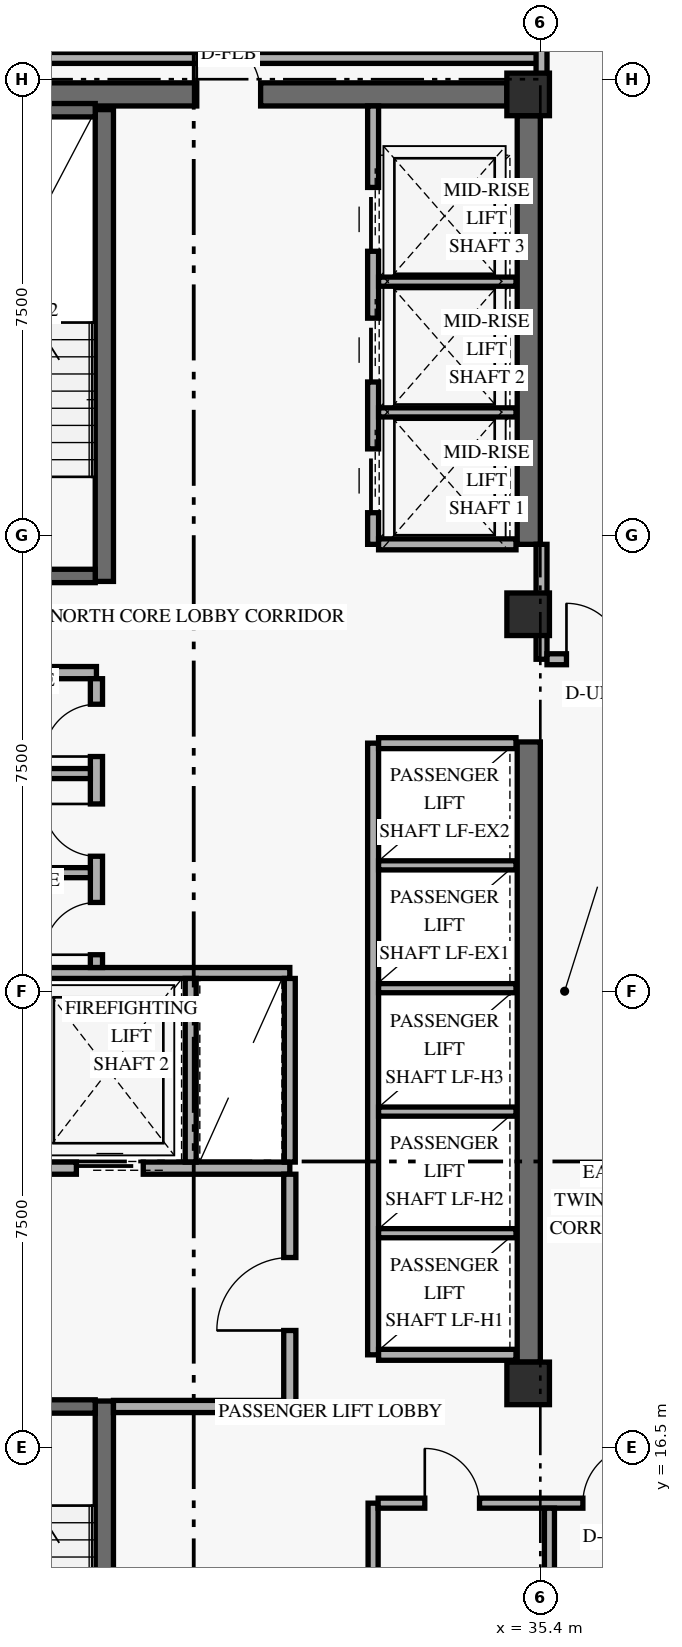
"""IFC4 building model, lengths in metres.
Left out: names, types, materials, properties, quantities, classifications, styles, units other than length and angle.
Written with IfcOpenShell. Run it as: python <this file> out.ifc"""

import sys

from ifc_helpers import new_model, si_unit, direction, frame, frame_2d, origin, origin_2d, place, context, subcontext, project, spatial, rectangle, extrude, element, fill, save


model = new_model("IFC4")
c1 = context("Model", 3, precision=1e-05, world=origin(), true_north=direction((0.0, 1.0)))
c2 = subcontext(c1, "Body", "Model", "MODEL_VIEW")
j1 = project(units=[si_unit("LENGTHUNIT", "METRE"), si_unit("PLANEANGLEUNIT", "RADIAN")], contexts=[c1])
p1 = place(None, origin())
s1 = spatial("IfcSite", under=j1, at=p1, CompositionType="ELEMENT")
p2 = place(p1, origin())
s2 = spatial("IfcBuilding", under=s1, at=p2, CompositionType="ELEMENT")
p3 = place(p2, frame((0.0, 0.0, 151.8)))
s3 = spatial("IfcBuildingStorey", under=s2, at=p3, CompositionType="ELEMENT", Elevation=151.8)
p4 = place(p3, frame((35.21, 17.9, 0.0), z_axis=(0.0, 0.0, 1.0), x_axis=(0.0, 1.0, 0.0)))
e1 = element("IfcWall", 1, at=p4, inside=s3, PredefinedType="SHEAR", context=c2, shape_type="SweptSolid", body=[
    extrude(rectangle(XDim=10.2, YDim=0.38, at=frame_2d((5.1, 0.0))), origin(), (0.0, 0.0, 1.0), 2.748),
])
p5 = place(p3, frame((35.21, 31.35, 0.0), z_axis=(0.0, 0.0, 1.0), x_axis=(0.0, 1.0, 0.0)))
e2 = element("IfcWall", 2, at=p5, inside=s3, PredefinedType="SHEAR", context=c2, shape_type="SweptSolid", body=[
    extrude(rectangle(XDim=7.05, YDim=0.38, at=frame_2d((3.525, 0.0))), origin(), (0.0, 0.0, 1.0), 2.748),
])
p6 = place(p3, frame((24.55, 38.75, 0.0), z_axis=(0.0, 0.0, 1.0), x_axis=(1.0, 0.0, 0.0)))
e3 = element("IfcWall", 3, at=p6, inside=s3, PredefinedType="SHEAR", context=c2, shape_type="SweptSolid", body=[
    extrude(rectangle(XDim=10.3, YDim=0.38, at=frame_2d((5.15, 0.0))), origin(), (0.0, 0.0, 1.0), 3.36),
])
p7 = place(p6, frame((5.2, 0.0, 0.0)))
e4 = element("IfcOpeningElement", 4, at=p7, cuts=e3, PredefinedType="OPENING", context=c2, shape_type="SweptSolid", body=[
    extrude(rectangle(XDim=1.05, YDim=2.15, at=frame_2d((0.525, 1.075))), frame((0.0, 0.2, 0.0), z_axis=(0.0, -1.0, 0.0), x_axis=(1.0, 0.0, 0.0)), (0.0, 0.0, 1.0), 0.4),
])
p8 = place(p3, frame((28.23, 9.5, 0.0), z_axis=(0.0, 0.0, 1.0), x_axis=(0.0, 1.0, 0.0)))
e5 = element("IfcWall", 5, at=p8, inside=s3, PredefinedType="SHEAR", context=c2, shape_type="SweptSolid", body=[
    extrude(rectangle(XDim=7.76, YDim=0.3, at=frame_2d((3.88, 0.0))), origin(), (0.0, 0.0, 1.0), 3.36),
])
p9 = place(p3, frame((24.92, 17.17, 0.0), z_axis=(0.0, 0.0, 1.0), x_axis=(1.0, 0.0, 0.0)))
e6 = element("IfcWall", 6, at=p9, inside=s3, PredefinedType="SHEAR", context=c2, shape_type="SweptSolid", body=[
    extrude(rectangle(XDim=3.16, YDim=0.22, at=frame_2d((1.58, 0.0))), origin(), (0.0, 0.0, 1.0), 3.36),
])
p10 = place(p9, frame((0.78, 0.0, 0.0)))
e7 = element("IfcOpeningElement", 7, at=p10, cuts=e6, PredefinedType="OPENING", context=c2, shape_type="SweptSolid", body=[
    extrude(rectangle(XDim=1.05, YDim=2.15, at=frame_2d((0.525, 1.075))), frame((0.0, 0.12, 0.0), z_axis=(0.0, -1.0, 0.0), x_axis=(1.0, 0.0, 0.0)), (0.0, 0.0, 1.0), 0.24),
])
p11 = place(p3, frame((28.23, 30.74, 0.0), z_axis=(0.0, 0.0, 1.0), x_axis=(0.0, 1.0, 0.0)))
e8 = element("IfcWall", 8, at=p11, inside=s3, PredefinedType="SHEAR", context=c2, shape_type="SweptSolid", body=[
    extrude(rectangle(XDim=7.76, YDim=0.3, at=frame_2d((3.88, 0.0))), origin(), (0.0, 0.0, 1.0), 3.36),
])
p12 = place(p3, frame((24.92, 30.83, 0.0), z_axis=(0.0, 0.0, 1.0), x_axis=(1.0, 0.0, 0.0)))
e9 = element("IfcWall", 9, at=p12, inside=s3, PredefinedType="SHEAR", context=c2, shape_type="SweptSolid", body=[
    extrude(rectangle(XDim=3.16, YDim=0.22, at=frame_2d((1.58, 0.0))), origin(), (0.0, 0.0, 1.0), 3.36),
])
p13 = place(p12, frame((0.78, 0.0, 0.0)))
e10 = element("IfcOpeningElement", 10, at=p13, cuts=e9, PredefinedType="OPENING", context=c2, shape_type="SweptSolid", body=[
    extrude(rectangle(XDim=1.05, YDim=2.15, at=frame_2d((0.525, 1.075))), frame((0.0, 0.12, 0.0), z_axis=(0.0, -1.0, 0.0), x_axis=(1.0, 0.0, 0.0)), (0.0, 0.0, 1.0), 0.24),
])
p14 = place(p3, frame((24.92, 38.49, 0.0), z_axis=(0.0, 0.0, 1.0), x_axis=(1.0, 0.0, 0.0)))
e11 = element("IfcWall", 11, at=p14, inside=s3, PredefinedType="SHEAR", context=c2, shape_type="SweptSolid", body=[
    extrude(rectangle(XDim=3.16, YDim=0.22, at=frame_2d((1.58, 0.0))), origin(), (0.0, 0.0, 1.0), 3.36),
])
for number, where, z_axis, x_axis in (
    (12, (35.2, 17.55, 0.0), (0.0, 0.0, 1.0), (1.0, 0.0, 0.0)),
    (13, (35.2, 30.2, 0.0), (0.0, 0.0, 1.0), (1.0, 0.0, 0.0)),
    (14, (35.2, 38.75, 0.0), (0.0, 0.0, 1.0), (1.0, 0.0, 0.0)),
):
    element("IfcColumn", number, at=place(p3, frame(where, z_axis=z_axis, x_axis=x_axis)), inside=s3, PredefinedType="COLUMN", context=c2, shape_type="SweptSolid", body=[
        extrude(rectangle(XDim=0.7, YDim=0.7, at=origin_2d()), origin(), (0.0, 0.0, 1.0), 3.6),
    ])
p15 = place(p3, frame((24.45, 21.09, 0.0), z_axis=(0.0, 0.0, 1.0), x_axis=(1.0, 0.0, 0.0)))
e15 = element("IfcWall", 15, at=p15, inside=s3, PredefinedType="STANDARD", context=c2, shape_type="SweptSolid", body=[
    extrude(rectangle(XDim=6.83, YDim=0.2, at=frame_2d((3.415, 0.0))), origin(), (0.0, 0.0, 1.0), 3.36),
])
p16 = place(p15, frame((0.72, 0.0, 0.0)))
e16 = element("IfcOpeningElement", 16, at=p16, cuts=e15, PredefinedType="OPENING", context=c2, shape_type="SweptSolid", body=[
    extrude(rectangle(XDim=1.1, YDim=2.2, at=frame_2d((0.55, 1.1))), frame((0.0, 0.11, 0.0), z_axis=(0.0, -1.0, 0.0), x_axis=(1.0, 0.0, 0.0)), (0.0, 0.0, 1.0), 0.22),
])
p17 = place(p15, frame((3.32, 0.0, 0.0)))
e17 = element("IfcOpeningElement", 17, at=p17, cuts=e15, PredefinedType="OPENING", context=c2, shape_type="SweptSolid", body=[
    extrude(rectangle(XDim=1.1, YDim=2.2, at=frame_2d((0.55, 1.1))), frame((0.0, 0.11, 0.0), z_axis=(0.0, -1.0, 0.0), x_axis=(1.0, 0.0, 0.0)), (0.0, 0.0, 1.0), 0.22),
])
p18 = place(p3, frame((28.38, 17.17, 0.0), z_axis=(0.0, 0.0, 1.0), x_axis=(1.0, 0.0, 0.0)))
e18 = element("IfcWall", 18, at=p18, inside=s3, PredefinedType="STANDARD", context=c2, shape_type="SweptSolid", body=[
    extrude(rectangle(XDim=2.9, YDim=0.2, at=frame_2d((1.45, 0.0))), origin(), (0.0, 0.0, 1.0), 3.36),
])
p19 = place(p3, frame((31.28, 17.07, 0.0), z_axis=(0.0, 0.0, 1.0), x_axis=(0.0, 1.0, 0.0)))
e19 = element("IfcWall", 19, at=p19, inside=s3, PredefinedType="STANDARD", context=c2, shape_type="SweptSolid", body=[
    extrude(rectangle(XDim=3.92, YDim=0.2, at=frame_2d((1.96, 0.0))), origin(), (0.0, 0.0, 1.0), 2.73),
])
p20 = place(p19, frame((1.35, 0.0, 0.0)))
e20 = element("IfcOpeningElement", 20, at=p20, cuts=e19, PredefinedType="OPENING", context=c2, shape_type="SweptSolid", body=[
    extrude(rectangle(XDim=1.2, YDim=2.15, at=frame_2d((0.6, 1.075))), frame((0.0, 0.11, 0.0), z_axis=(0.0, -1.0, 0.0), x_axis=(1.0, 0.0, 0.0)), (0.0, 0.0, 1.0), 0.22),
])
p21 = place(p3, frame((24.45, 24.3, 0.0), z_axis=(0.0, 0.0, 1.0), x_axis=(1.0, 0.0, 0.0)))
e21 = element("IfcWall", 21, at=p21, inside=s3, PredefinedType="STANDARD", context=c2, shape_type="SweptSolid", body=[
    extrude(rectangle(XDim=6.83, YDim=0.18, at=frame_2d((3.415, 0.0))), origin(), (0.0, 0.0, 1.0), 3.36),
])
for number, where, z_axis, x_axis in (
    (22, (29.65, 21.19, 0.0), (0.0, 0.0, 1.0), (0.0, 1.0, 0.0)),
    (23, (31.28, 21.19, 0.0), (0.0, 0.0, 1.0), (0.0, 1.0, 0.0)),
):
    element("IfcWall", number, at=place(p3, frame(where, z_axis=z_axis, x_axis=x_axis)), inside=s3, PredefinedType="STANDARD", context=c2, shape_type="SweptSolid", body=[
        extrude(rectangle(XDim=3.02, YDim=0.18, at=frame_2d((1.51, 0.0))), origin(), (0.0, 0.0, 1.0), 3.36),
    ])
p22 = place(p3, frame((24.45, 29.24, 0.0), z_axis=(0.0, 0.0, 1.0), x_axis=(1.0, 0.0, 0.0)))
e24 = element("IfcWall", 24, at=p22, inside=s3, PredefinedType="STANDARD", context=c2, shape_type="SweptSolid", body=[
    extrude(rectangle(XDim=3.65, YDim=0.2, at=frame_2d((1.825, 0.0))), origin(), (0.0, 0.0, 1.0), 3.36),
])
p23 = place(p3, frame((28.1, 24.39, 0.0), z_axis=(0.0, 0.0, 1.0), x_axis=(0.0, 1.0, 0.0)))
e25 = element("IfcWall", 25, at=p23, inside=s3, PredefinedType="STANDARD", context=c2, shape_type="SweptSolid", body=[
    extrude(rectangle(XDim=4.75, YDim=0.2, at=frame_2d((2.375, 0.0))), origin(), (0.0, 0.0, 1.0), 3.36),
])
p24 = place(p23, frame((0.21, 0.0, 0.0)))
e26 = element("IfcOpeningElement", 26, at=p24, cuts=e25, PredefinedType="OPENING", context=c2, shape_type="SweptSolid", body=[
    extrude(rectangle(XDim=0.86, YDim=2.1, at=frame_2d((0.43, 1.05))), frame((0.0, 0.11, 0.0), z_axis=(0.0, -1.0, 0.0), x_axis=(1.0, 0.0, 0.0)), (0.0, 0.0, 1.0), 0.22),
])
p25 = place(p23, frame((1.83, 0.0, 0.0)))
e27 = element("IfcOpeningElement", 27, at=p25, cuts=e25, PredefinedType="OPENING", context=c2, shape_type="SweptSolid", body=[
    extrude(rectangle(XDim=0.86, YDim=2.1, at=frame_2d((0.43, 1.05))), frame((0.0, 0.11, 0.0), z_axis=(0.0, -1.0, 0.0), x_axis=(1.0, 0.0, 0.0)), (0.0, 0.0, 1.0), 0.22),
])
p26 = place(p23, frame((3.47, 0.0, 0.0)))
e28 = element("IfcOpeningElement", 28, at=p26, cuts=e25, PredefinedType="OPENING", context=c2, shape_type="SweptSolid", body=[
    extrude(rectangle(XDim=0.86, YDim=2.1, at=frame_2d((0.43, 1.05))), frame((0.0, 0.11, 0.0), z_axis=(0.0, -1.0, 0.0), x_axis=(1.0, 0.0, 0.0)), (0.0, 0.0, 1.0), 0.22),
])
for number, where, z_axis, x_axis in (
    (29, (24.45, 25.95, 0.0), (0.0, 0.0, 1.0), (1.0, 0.0, 0.0)),
    (30, (24.45, 27.58, 0.0), (0.0, 0.0, 1.0), (1.0, 0.0, 0.0)),
):
    element("IfcWall", number, at=place(p3, frame(where, z_axis=z_axis, x_axis=x_axis)), inside=s3, PredefinedType="PARTITIONING", context=c2, shape_type="SweptSolid", body=[
        extrude(rectangle(XDim=3.55, YDim=0.165, at=frame_2d((1.775, 0.0))), origin(), (0.0, 0.0, 1.0), 3.36),
    ])
p27 = place(p3, frame((32.65, 18.02, 0.0), z_axis=(0.0, 0.0, 1.0), x_axis=(0.0, 1.0, 0.0)))
e31 = element("IfcWall", 31, at=p27, inside=s3, PredefinedType="STANDARD", context=c2, shape_type="SweptSolid", body=[
    extrude(rectangle(XDim=10.06, YDim=0.18, at=frame_2d((5.03, 0.0))), origin(), (0.0, 0.0, 1.0), 3.36),
])
for number, where, z_axis, x_axis in (
    (32, (32.74, 18.02, 0.0), (0.0, 0.0, 1.0), (1.0, 0.0, 0.0)),
    (33, (32.74, 28.08, 0.0), (0.0, 0.0, 1.0), (1.0, 0.0, 0.0)),
):
    element("IfcWall", number, at=place(p3, frame(where, z_axis=z_axis, x_axis=x_axis)), inside=s3, PredefinedType="STANDARD", context=c2, shape_type="SweptSolid", body=[
        extrude(rectangle(XDim=2.26, YDim=0.18, at=frame_2d((1.13, 0.0))), origin(), (0.0, 0.0, 1.0), 3.36),
    ])
for number, where, z_axis, x_axis in (
    (34, (32.74, 20.02, 0.0), (0.0, 0.0, 1.0), (1.0, 0.0, 0.0)),
    (35, (32.74, 22.02, 0.0), (0.0, 0.0, 1.0), (1.0, 0.0, 0.0)),
    (36, (32.74, 24.05, 0.0), (0.0, 0.0, 1.0), (1.0, 0.0, 0.0)),
    (37, (32.74, 26.07, 0.0), (0.0, 0.0, 1.0), (1.0, 0.0, 0.0)),
):
    element("IfcWall", number, at=place(p3, frame(where, z_axis=z_axis, x_axis=x_axis)), inside=s3, PredefinedType="STANDARD", context=c2, shape_type="SweptSolid", body=[
        extrude(rectangle(XDim=2.26, YDim=0.15, at=frame_2d((1.13, 0.0))), origin(), (0.0, 0.0, 1.0), 3.36),
    ])
p28 = place(p3, frame((32.65, 31.35, 0.0), z_axis=(0.0, 0.0, 1.0), x_axis=(0.0, 1.0, 0.0)))
e38 = element("IfcWall", 38, at=p28, inside=s3, PredefinedType="STANDARD", context=c2, shape_type="SweptSolid", body=[
    extrude(rectangle(XDim=7.21, YDim=0.18, at=frame_2d((3.605, 0.0))), origin(), (0.0, 0.0, 1.0), 3.36),
])
p29 = place(p28, frame((0.52, 0.0, 0.0)))
e39 = element("IfcOpeningElement", 39, at=p29, cuts=e38, PredefinedType="OPENING", context=c2, shape_type="SweptSolid", body=[
    extrude(rectangle(XDim=1.05, YDim=2.2, at=frame_2d((0.525, 1.1))), frame((0.0, 0.1, 0.0), z_axis=(0.0, -1.0, 0.0), x_axis=(1.0, 0.0, 0.0)), (0.0, 0.0, 1.0), 0.2),
])
p30 = place(p28, frame((2.67, 0.0, 0.0)))
e40 = element("IfcOpeningElement", 40, at=p30, cuts=e38, PredefinedType="OPENING", context=c2, shape_type="SweptSolid", body=[
    extrude(rectangle(XDim=1.05, YDim=2.2, at=frame_2d((0.525, 1.1))), frame((0.0, 0.1, 0.0), z_axis=(0.0, -1.0, 0.0), x_axis=(1.0, 0.0, 0.0)), (0.0, 0.0, 1.0), 0.2),
])
p31 = place(p28, frame((4.82, 0.0, 0.0)))
e41 = element("IfcOpeningElement", 41, at=p31, cuts=e38, PredefinedType="OPENING", context=c2, shape_type="SweptSolid", body=[
    extrude(rectangle(XDim=1.05, YDim=2.2, at=frame_2d((0.525, 1.1))), frame((0.0, 0.1, 0.0), z_axis=(0.0, -1.0, 0.0), x_axis=(1.0, 0.0, 0.0)), (0.0, 0.0, 1.0), 0.2),
])
p32 = place(p3, frame((32.74, 31.35, 0.0), z_axis=(0.0, 0.0, 1.0), x_axis=(1.0, 0.0, 0.0)))
e42 = element("IfcWall", 42, at=p32, inside=s3, PredefinedType="STANDARD", context=c2, shape_type="SweptSolid", body=[
    extrude(rectangle(XDim=2.26, YDim=0.18, at=frame_2d((1.13, 0.0))), origin(), (0.0, 0.0, 1.0), 3.36),
])
for number, where, z_axis, x_axis in (
    (43, (32.74, 33.52, 0.0), (0.0, 0.0, 1.0), (1.0, 0.0, 0.0)),
    (44, (32.74, 35.67, 0.0), (0.0, 0.0, 1.0), (1.0, 0.0, 0.0)),
):
    element("IfcWall", number, at=place(p3, frame(where, z_axis=z_axis, x_axis=x_axis)), inside=s3, PredefinedType="STANDARD", context=c2, shape_type="SweptSolid", body=[
        extrude(rectangle(XDim=2.26, YDim=0.15, at=frame_2d((1.13, 0.0))), origin(), (0.0, 0.0, 1.0), 3.36),
    ])
p33 = place(p3, frame((32.65, 9.5, 0.0), z_axis=(0.0, 0.0, 1.0), x_axis=(0.0, 1.0, 0.0)))
e45 = element("IfcWall", 45, at=p33, inside=s3, PredefinedType="PARTITIONING", context=c2, shape_type="SweptSolid", body=[
    extrude(rectangle(XDim=6.08, YDim=0.165, at=frame_2d((3.04, 0.0))), origin(), (0.0, 0.0, 1.0), 3.36),
])
p34 = place(p3, frame((32.732, 15.58, 0.0), z_axis=(0.0, 0.0, 1.0), x_axis=(1.0, 0.0, 0.0)))
e46 = element("IfcWall", 46, at=p34, inside=s3, PredefinedType="PARTITIONING", context=c2, shape_type="SweptSolid", body=[
    extrude(rectangle(XDim=5.618, YDim=0.165, at=frame_2d((2.809, 0.0))), origin(), (0.0, 0.0, 1.0), 2.73),
])
p35 = place(p34, frame((0.768, 0.0, 0.0)))
e47 = element("IfcOpeningElement", 47, at=p35, cuts=e46, PredefinedType="OPENING", context=c2, shape_type="SweptSolid", body=[
    extrude(rectangle(XDim=0.9, YDim=2.1, at=frame_2d((0.45, 1.05))), frame((0.0, 0.093, 0.0), z_axis=(0.0, -1.0, 0.0), x_axis=(1.0, 0.0, 0.0)), (0.0, 0.0, 1.0), 0.185),
])
p36 = place(p34, frame((3.367, 0.0, 0.0)))
e48 = element("IfcOpeningElement", 48, at=p36, cuts=e46, PredefinedType="OPENING", context=c2, shape_type="SweptSolid", body=[
    extrude(rectangle(XDim=0.95, YDim=2.15, at=frame_2d((0.475, 1.075))), frame((0.0, 0.093, 0.0), z_axis=(0.0, -1.0, 0.0), x_axis=(1.0, 0.0, 0.0)), (0.0, 0.0, 1.0), 0.185),
])
p37 = place(p3, frame((35.55, 9.5, 0.0), z_axis=(0.0, 0.0, 1.0), x_axis=(0.0, 1.0, 0.0)))
e49 = element("IfcWall", 49, at=p37, inside=s3, PredefinedType="PARTITIONING", context=c2, shape_type="SweptSolid", body=[
    extrude(rectangle(XDim=5.998, YDim=0.165, at=frame_2d((2.999, 0.0))), origin(), (0.0, 0.0, 1.0), 2.984),
])
p38 = place(p3, frame((35.42, 29.46, 0.0), z_axis=(0.0, 0.0, 1.0), x_axis=(0.0, 1.0, 0.0)))
e50 = element("IfcWall", 50, at=p38, inside=s3, PredefinedType="STANDARD", context=c2, shape_type="SweptSolid", body=[
    extrude(rectangle(XDim=1.89, YDim=0.18, at=frame_2d((0.945, 0.0))), origin(), (0.0, 0.0, 1.0), 2.73),
])
p39 = place(p3, frame((35.51, 29.46, 0.0), z_axis=(0.0, 0.0, 1.0), x_axis=(1.0, 0.0, 0.0)))
e51 = element("IfcWall", 51, at=p39, inside=s3, PredefinedType="STANDARD", context=c2, shape_type="SweptSolid", body=[
    extrude(rectangle(XDim=12.49, YDim=0.18, at=frame_2d((6.245, 0.0))), origin(), (0.0, 0.0, 1.0), 2.73),
])
p40 = place(p39, frame((0.32, 0.0, 0.0)))
e52 = element("IfcOpeningElement", 52, at=p40, cuts=e51, PredefinedType="OPENING", context=c2, shape_type="SweptSolid", body=[
    extrude(rectangle(XDim=0.92, YDim=2.15, at=frame_2d((0.46, 1.075))), frame((0.0, 0.1, 0.0), z_axis=(0.0, -1.0, 0.0), x_axis=(1.0, 0.0, 0.0)), (0.0, 0.0, 1.0), 0.2),
])
p41 = place(p3, frame((23.85, 39.35, 0.0), z_axis=(0.0, 0.0, 1.0), x_axis=(1.0, 0.0, 0.0)))
e53 = element("IfcWall", 53, at=p41, inside=s3, PredefinedType="STANDARD", context=c2, shape_type="SweptSolid", body=[
    extrude(rectangle(XDim=11.57, YDim=0.18, at=frame_2d((5.785, 0.0))), origin(), (0.0, 0.0, 1.0), 2.73),
])
p42 = place(p3, frame((35.42, 38.75, 0.0), z_axis=(0.0, 0.0, 1.0), x_axis=(0.0, 1.0, 0.0)))
e54 = element("IfcWall", 54, at=p42, inside=s3, PredefinedType="PARTITIONING", context=c2, shape_type="SweptSolid", body=[
    extrude(rectangle(XDim=4.97, YDim=0.18, at=frame_2d((2.485, 0.0))), origin(), (0.0, 0.0, 1.0), 2.73),
])
p43 = place(p17, origin())
e55 = element("IfcDoor", 55, at=p43, inside=s3, OperationType="SLIDING_TO_LEFT", PredefinedType="DOOR", context=c2, shape_type="SweptSolid", body=[
    extrude(rectangle(XDim=1.1, YDim=2.2, at=frame_2d((0.55, 1.1))), frame((0.0, 0.025, 0.0), z_axis=(0.0, -1.0, 0.0), x_axis=(1.0, 0.0, 0.0)), (0.0, 0.0, 1.0), 0.05),
])
fill(e17, e55)
p44 = place(p20, origin())
e56 = element("IfcDoor", 56, at=p44, inside=s3, OperationType="SINGLE_SWING_LEFT", PredefinedType="DOOR", context=c2, shape_type="SweptSolid", body=[
    extrude(rectangle(XDim=1.2, YDim=2.15, at=frame_2d((0.6, 1.075))), frame((0.0, 0.025, 0.0), z_axis=(0.0, -1.0, 0.0), x_axis=(1.0, 0.0, 0.0)), (0.0, 0.0, 1.0), 0.05),
])
fill(e20, e56)
p45 = place(p24, origin())
e57 = element("IfcDoor", 57, at=p45, inside=s3, OperationType="SINGLE_SWING_LEFT", PredefinedType="DOOR", context=c2, shape_type="SweptSolid", body=[
    extrude(rectangle(XDim=0.86, YDim=2.1, at=frame_2d((0.43, 1.05))), frame((0.0, 0.025, 0.0), z_axis=(0.0, -1.0, 0.0), x_axis=(1.0, 0.0, 0.0)), (0.0, 0.0, 1.0), 0.05),
])
fill(e26, e57)
p46 = place(p25, origin())
e58 = element("IfcDoor", 58, at=p46, inside=s3, OperationType="SINGLE_SWING_RIGHT", PredefinedType="DOOR", context=c2, shape_type="SweptSolid", body=[
    extrude(rectangle(XDim=0.86, YDim=2.1, at=frame_2d((0.43, 1.05))), frame((0.0, 0.025, 0.0), z_axis=(0.0, -1.0, 0.0), x_axis=(1.0, 0.0, 0.0)), (0.0, 0.0, 1.0), 0.05),
])
fill(e27, e58)
p47 = place(p26, origin())
e59 = element("IfcDoor", 59, at=p47, inside=s3, OperationType="SINGLE_SWING_LEFT", PredefinedType="DOOR", context=c2, shape_type="SweptSolid", body=[
    extrude(rectangle(XDim=0.86, YDim=2.1, at=frame_2d((0.43, 1.05))), frame((0.0, 0.025, 0.0), z_axis=(0.0, -1.0, 0.0), x_axis=(1.0, 0.0, 0.0)), (0.0, 0.0, 1.0), 0.05),
])
fill(e28, e59)
p48 = place(p29, origin())
e60 = element("IfcDoor", 60, at=p48, inside=s3, OperationType="SLIDING_TO_LEFT", PredefinedType="DOOR", context=c2, shape_type="SweptSolid", body=[
    extrude(rectangle(XDim=1.05, YDim=2.2, at=frame_2d((0.525, 1.1))), frame((0.0, 0.025, 0.0), z_axis=(0.0, -1.0, 0.0), x_axis=(1.0, 0.0, 0.0)), (0.0, 0.0, 1.0), 0.05),
])
fill(e39, e60)
p49 = place(p30, origin())
e61 = element("IfcDoor", 61, at=p49, inside=s3, OperationType="SLIDING_TO_LEFT", PredefinedType="DOOR", context=c2, shape_type="SweptSolid", body=[
    extrude(rectangle(XDim=1.05, YDim=2.2, at=frame_2d((0.525, 1.1))), frame((0.0, 0.025, 0.0), z_axis=(0.0, -1.0, 0.0), x_axis=(1.0, 0.0, 0.0)), (0.0, 0.0, 1.0), 0.05),
])
fill(e40, e61)
p50 = place(p31, origin())
e62 = element("IfcDoor", 62, at=p50, inside=s3, OperationType="SLIDING_TO_LEFT", PredefinedType="DOOR", context=c2, shape_type="SweptSolid", body=[
    extrude(rectangle(XDim=1.05, YDim=2.2, at=frame_2d((0.525, 1.1))), frame((0.0, 0.025, 0.0), z_axis=(0.0, -1.0, 0.0), x_axis=(1.0, 0.0, 0.0)), (0.0, 0.0, 1.0), 0.05),
])
fill(e41, e62)
p51 = place(p35, origin())
e63 = element("IfcDoor", 63, at=p51, inside=s3, OperationType="SINGLE_SWING_LEFT", PredefinedType="DOOR", context=c2, shape_type="SweptSolid", body=[
    extrude(rectangle(XDim=0.9, YDim=2.1, at=frame_2d((0.45, 1.05))), frame((0.0, 0.025, 0.0), z_axis=(0.0, -1.0, 0.0), x_axis=(1.0, 0.0, 0.0)), (0.0, 0.0, 1.0), 0.05),
])
fill(e47, e63)
p52 = place(p36, origin())
e64 = element("IfcDoor", 64, at=p52, inside=s3, OperationType="SINGLE_SWING_RIGHT", PredefinedType="DOOR", context=c2, shape_type="SweptSolid", body=[
    extrude(rectangle(XDim=0.95, YDim=2.15, at=frame_2d((0.475, 1.075))), frame((0.0, 0.025, 0.0), z_axis=(0.0, -1.0, 0.0), x_axis=(1.0, 0.0, 0.0)), (0.0, 0.0, 1.0), 0.05),
])
fill(e48, e64)
p53 = place(p7, frame((1.05, 0.0, 0.0), z_axis=(0.0, 0.0, 1.0), x_axis=(-1.0, 0.0, 0.0)))
e65 = element("IfcDoor", 65, at=p53, inside=s3, OperationType="SINGLE_SWING_RIGHT", PredefinedType="DOOR", context=c2, shape_type="SweptSolid", body=[
    extrude(rectangle(XDim=1.05, YDim=2.15, at=frame_2d((0.525, 1.075))), frame((0.0, 0.025, 0.0), z_axis=(0.0, -1.0, 0.0), x_axis=(1.0, 0.0, 0.0)), (0.0, 0.0, 1.0), 0.05),
])
fill(e4, e65)
p54 = place(p40, origin())
e66 = element("IfcDoor", 66, at=p54, inside=s3, OperationType="SINGLE_SWING_LEFT", PredefinedType="DOOR", context=c2, shape_type="SweptSolid", body=[
    extrude(rectangle(XDim=0.92, YDim=2.15, at=frame_2d((0.46, 1.075))), frame((0.0, 0.025, 0.0), z_axis=(0.0, -1.0, 0.0), x_axis=(1.0, 0.0, 0.0)), (0.0, 0.0, 1.0), 0.05),
])
fill(e52, e66)
save(model, sys.argv[1])
